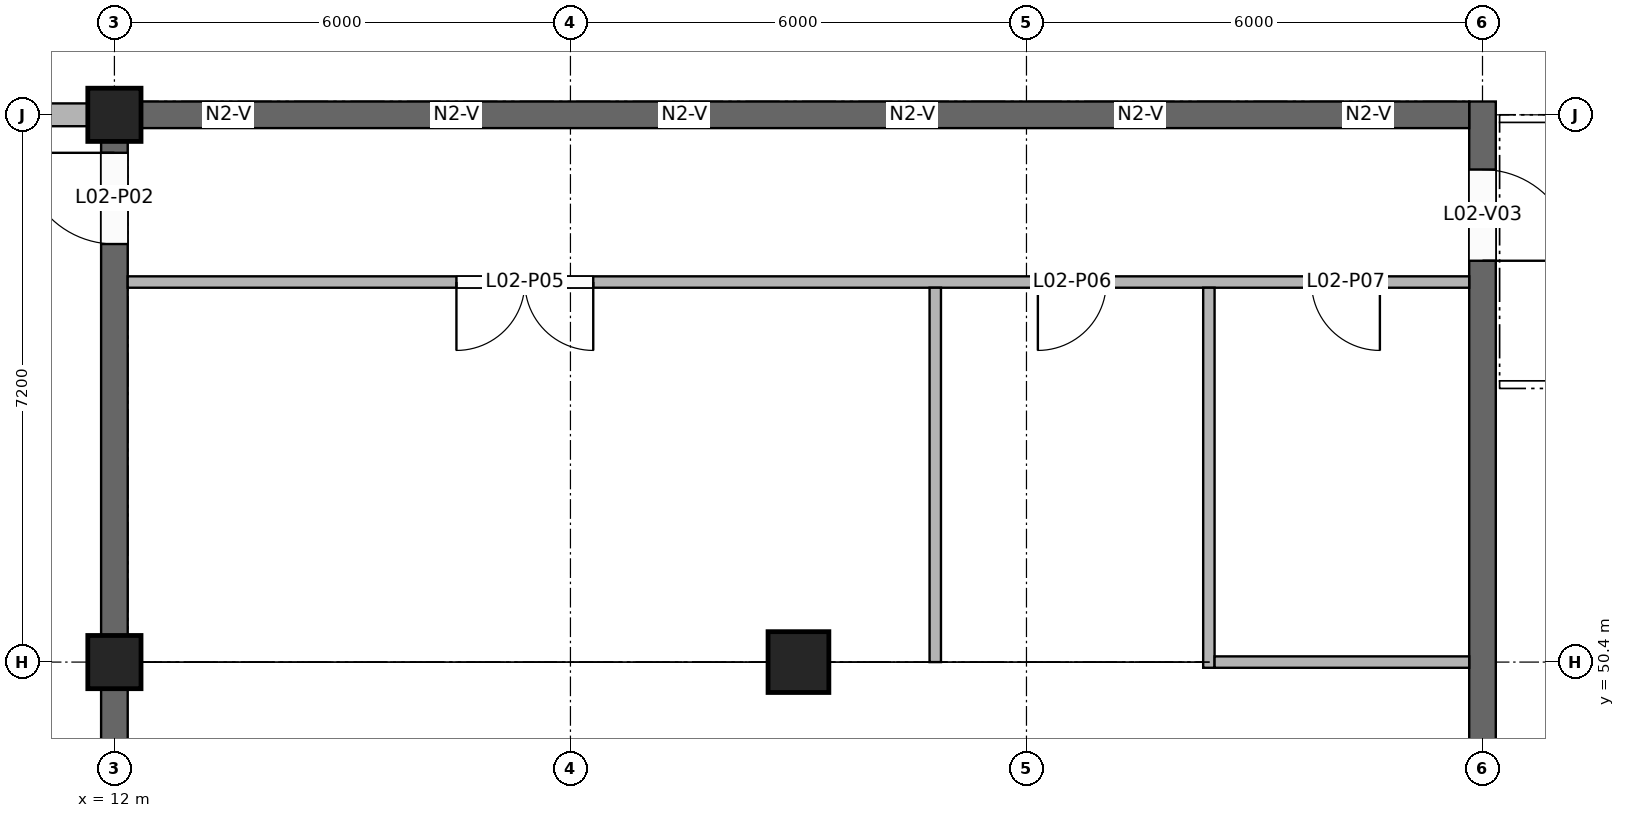
"""IFC4 building model, lengths in metres.
Left out: names, types, materials, properties, quantities, classifications, styles, units other than length and angle.
Written with IfcOpenShell. Run it as: python <this file> out.ifc"""

import sys

from ifc_helpers import new_model, si_unit, direction, frame, frame_2d, origin, origin_2d, place, context, subcontext, project, spatial, rectangle, extrude, element, fill, save


model = new_model("IFC4")
c1 = context("Model", 3, precision=1e-05, world=origin(), true_north=direction((0.0, 1.0)))
c2 = subcontext(c1, "Body", "Model", "MODEL_VIEW")
j1 = project(units=[si_unit("LENGTHUNIT", "METRE"), si_unit("PLANEANGLEUNIT", "RADIAN")], contexts=[c1])
p1 = place(None, origin())
s1 = spatial("IfcSite", under=j1, at=p1, CompositionType="ELEMENT")
p2 = place(p1, origin())
s2 = spatial("IfcBuilding", under=s1, at=p2, CompositionType="ELEMENT")
p3 = place(p2, frame((0.0, 0.0, 8.4)))
s3 = spatial("IfcBuildingStorey", under=s2, at=p3, CompositionType="ELEMENT", Elevation=8.4)
for number, where, z_axis, x_axis in (
    (1, (12.0, 50.4, 0.0), (0.0, 0.0, 1.0), (1.0, 0.0, 0.0)),
    (2, (12.0, 57.6, 0.0), (0.0, 0.0, 1.0), (1.0, 0.0, 0.0)),
):
    element("IfcColumn", number, at=place(p3, frame(where, z_axis=z_axis, x_axis=x_axis)), inside=s3, PredefinedType="COLUMN", context=c2, shape_type="SweptSolid", body=[
        extrude(rectangle(XDim=0.7, YDim=0.7, at=origin_2d()), origin(), (0.0, 0.0, 1.0), 4.0),
    ])
p4 = place(p3, frame((30.0, 35.825, 0.0), z_axis=(0.0, 0.0, 1.0), x_axis=(0.0, 1.0, 0.0)))
e3 = element("IfcWall", 3, at=p4, inside=s3, PredefinedType="SHEAR", context=c2, shape_type="SweptSolid", body=[
    extrude(rectangle(XDim=21.95, YDim=0.35, at=frame_2d((10.975, 0.0))), origin(), (0.0, 0.0, 1.0), 4.2),
])
p5 = place(p4, frame((19.855, 0.0, 0.0)))
e4 = element("IfcOpeningElement", 4, at=p5, cuts=e3, PredefinedType="OPENING", context=c2, shape_type="SweptSolid", body=[
    extrude(rectangle(XDim=1.2, YDim=2.4, at=frame_2d((0.6, 1.2))), frame((0.0, 0.185, 0.0), z_axis=(0.0, -1.0, 0.0), x_axis=(1.0, 0.0, 0.0)), (0.0, 0.0, 1.0), 0.37),
])
p6 = place(p3, frame((12.0, 43.55, 0.0), z_axis=(0.0, 0.0, 1.0), x_axis=(0.0, 1.0, 0.0)))
e5 = element("IfcWall", 5, at=p6, inside=s3, PredefinedType="SHEAR", context=c2, shape_type="SweptSolid", body=[
    extrude(rectangle(XDim=6.5, YDim=0.35, at=frame_2d((3.25, 0.0))), origin(), (0.0, 0.0, 1.0), 3.1),
])
p7 = place(p3, frame((12.0, 50.75, 0.0), z_axis=(0.0, 0.0, 1.0), x_axis=(0.0, 1.0, 0.0)))
e6 = element("IfcWall", 6, at=p7, inside=s3, PredefinedType="SHEAR", context=c2, shape_type="SweptSolid", body=[
    extrude(rectangle(XDim=6.5, YDim=0.35, at=frame_2d((3.25, 0.0))), origin(), (0.0, 0.0, 1.0), 3.1),
])
p8 = place(p7, frame((5.15, 0.0, 0.0)))
e7 = element("IfcOpeningElement", 7, at=p8, cuts=e6, PredefinedType="OPENING", context=c2, shape_type="SweptSolid", body=[
    extrude(rectangle(XDim=1.2, YDim=2.1, at=frame_2d((0.6, 1.05))), frame((0.0, 0.185, 0.0), z_axis=(0.0, -1.0, 0.0), x_axis=(1.0, 0.0, 0.0)), (0.0, 0.0, 1.0), 0.37),
])
p9 = place(p3, frame((12.35, 57.6, 0.0), z_axis=(0.0, 0.0, 1.0), x_axis=(1.0, 0.0, 0.0)))
e8 = element("IfcWall", 8, at=p9, inside=s3, PredefinedType="SHEAR", context=c2, shape_type="SweptSolid", body=[
    extrude(rectangle(XDim=17.475, YDim=0.35, at=frame_2d((8.737, 0.0))), origin(), (0.0, 0.0, 1.0), 4.2),
])
p10 = place(p9, frame((0.85, 0.0, 1.2)))
e9 = element("IfcOpeningElement", 9, at=p10, cuts=e8, PredefinedType="OPENING", context=c2, shape_type="SweptSolid", body=[
    extrude(rectangle(XDim=0.6, YDim=2.4, at=frame_2d((0.3, 1.2))), frame((0.0, 0.185, 0.0), z_axis=(0.0, -1.0, 0.0), x_axis=(1.0, 0.0, 0.0)), (0.0, 0.0, 1.0), 0.37),
])
p11 = place(p9, frame((3.85, 0.0, 1.2)))
e10 = element("IfcOpeningElement", 10, at=p11, cuts=e8, PredefinedType="OPENING", context=c2, shape_type="SweptSolid", body=[
    extrude(rectangle(XDim=0.6, YDim=2.4, at=frame_2d((0.3, 1.2))), frame((0.0, 0.185, 0.0), z_axis=(0.0, -1.0, 0.0), x_axis=(1.0, 0.0, 0.0)), (0.0, 0.0, 1.0), 0.37),
])
p12 = place(p9, frame((6.85, 0.0, 1.2)))
e11 = element("IfcOpeningElement", 11, at=p12, cuts=e8, PredefinedType="OPENING", context=c2, shape_type="SweptSolid", body=[
    extrude(rectangle(XDim=0.6, YDim=2.4, at=frame_2d((0.3, 1.2))), frame((0.0, 0.185, 0.0), z_axis=(0.0, -1.0, 0.0), x_axis=(1.0, 0.0, 0.0)), (0.0, 0.0, 1.0), 0.37),
])
p13 = place(p9, frame((9.85, 0.0, 1.2)))
e12 = element("IfcOpeningElement", 12, at=p13, cuts=e8, PredefinedType="OPENING", context=c2, shape_type="SweptSolid", body=[
    extrude(rectangle(XDim=0.6, YDim=2.4, at=frame_2d((0.3, 1.2))), frame((0.0, 0.185, 0.0), z_axis=(0.0, -1.0, 0.0), x_axis=(1.0, 0.0, 0.0)), (0.0, 0.0, 1.0), 0.37),
])
p14 = place(p9, frame((12.85, 0.0, 1.2)))
e13 = element("IfcOpeningElement", 13, at=p14, cuts=e8, PredefinedType="OPENING", context=c2, shape_type="SweptSolid", body=[
    extrude(rectangle(XDim=0.6, YDim=2.4, at=frame_2d((0.3, 1.2))), frame((0.0, 0.185, 0.0), z_axis=(0.0, -1.0, 0.0), x_axis=(1.0, 0.0, 0.0)), (0.0, 0.0, 1.0), 0.37),
])
p15 = place(p9, frame((15.85, 0.0, 1.2)))
e14 = element("IfcOpeningElement", 14, at=p15, cuts=e8, PredefinedType="OPENING", context=c2, shape_type="SweptSolid", body=[
    extrude(rectangle(XDim=0.6, YDim=2.4, at=frame_2d((0.3, 1.2))), frame((0.0, 0.185, 0.0), z_axis=(0.0, -1.0, 0.0), x_axis=(1.0, 0.0, 0.0)), (0.0, 0.0, 1.0), 0.37),
])
p16 = place(p3, frame((21.0, 50.4, 0.0), z_axis=(0.0, 0.0, 1.0), x_axis=(1.0, 0.0, 0.0)))
e15 = element("IfcColumn", 15, at=p16, inside=s3, PredefinedType="COLUMN", context=c2, shape_type="SweptSolid", body=[
    extrude(rectangle(XDim=0.8, YDim=0.8, at=origin_2d()), origin(), (0.0, 0.0, 1.0), 4.0),
])
p17 = place(p3, frame((6.0, 57.6, 0.0), z_axis=(0.0, 0.0, 1.0), x_axis=(1.0, 0.0, 0.0)))
e16 = element("IfcWall", 16, at=p17, inside=s3, PredefinedType="SOLIDWALL", context=c2, shape_type="SweptSolid", body=[
    extrude(rectangle(XDim=5.65, YDim=0.3, at=frame_2d((2.825, 0.0))), origin(), (0.0, 0.0, 1.0), 3.2),
])
p18 = place(p17, frame((2.13, 0.0, 0.0)))
e17 = element("IfcOpeningElement", 17, at=p18, cuts=e16, PredefinedType="OPENING", context=c2, shape_type="SweptSolid", body=[
    extrude(rectangle(XDim=1.2, YDim=2.4, at=frame_2d((0.6, 1.2))), frame((0.0, 0.16, 0.0), z_axis=(0.0, -1.0, 0.0), x_axis=(1.0, 0.0, 0.0)), (0.0, 0.0, 1.0), 0.32),
])
p19 = place(p17, frame((0.465, 0.0, 0.9)))
e18 = element("IfcOpeningElement", 18, at=p19, cuts=e16, PredefinedType="OPENING", context=c2, shape_type="SweptSolid", body=[
    extrude(rectangle(XDim=1.2, YDim=1.5, at=frame_2d((0.6, 0.75))), frame((0.0, 0.16, 0.0), z_axis=(0.0, -1.0, 0.0), x_axis=(1.0, 0.0, 0.0)), (0.0, 0.0, 1.0), 0.32),
])
p20 = place(p3, frame((22.8, 50.4, 0.0), z_axis=(0.0, 0.0, 1.0), x_axis=(0.0, 1.0, 0.0)))
e19 = element("IfcWall", 19, at=p20, inside=s3, PredefinedType="PARTITIONING", context=c2, shape_type="SweptSolid", body=[
    extrude(rectangle(XDim=4.925, YDim=0.15, at=frame_2d((2.462, 0.0))), origin(), (0.0, 0.0, 1.0), 3.2),
])
p21 = place(p3, frame((26.4, 50.325, 0.0), z_axis=(0.0, 0.0, 1.0), x_axis=(0.0, 1.0, 0.0)))
e20 = element("IfcWall", 20, at=p21, inside=s3, PredefinedType="PARTITIONING", context=c2, shape_type="SweptSolid", body=[
    extrude(rectangle(XDim=5.0, YDim=0.15, at=frame_2d((2.5, 0.0))), origin(), (0.0, 0.0, 1.0), 3.2),
])
p22 = place(p3, frame((26.475, 50.4, 0.0), z_axis=(0.0, 0.0, 1.0), x_axis=(1.0, 0.0, 0.0)))
e21 = element("IfcWall", 21, at=p22, inside=s3, PredefinedType="PARTITIONING", context=c2, shape_type="SweptSolid", body=[
    extrude(rectangle(XDim=3.35, YDim=0.15, at=frame_2d((1.675, 0.0))), origin(), (0.0, 0.0, 1.0), 3.2),
])
p23 = place(p3, frame((12.175, 55.4, 0.0), z_axis=(0.0, 0.0, 1.0), x_axis=(1.0, 0.0, 0.0)))
e22 = element("IfcWall", 22, at=p23, inside=s3, PredefinedType="PARTITIONING", context=c2, shape_type="SweptSolid", body=[
    extrude(rectangle(XDim=17.65, YDim=0.15, at=frame_2d((8.825, 0.0))), origin(), (0.0, 0.0, 1.0), 3.1),
])
p24 = place(p23, frame((4.325, 0.0, 0.0)))
e23 = element("IfcOpeningElement", 23, at=p24, cuts=e22, PredefinedType="OPENING", context=c2, shape_type="SweptSolid", body=[
    extrude(rectangle(XDim=1.8, YDim=2.1, at=frame_2d((0.9, 1.05))), frame((0.0, 0.085, 0.0), z_axis=(0.0, -1.0, 0.0), x_axis=(1.0, 0.0, 0.0)), (0.0, 0.0, 1.0), 0.17),
])
p25 = place(p23, frame((11.975, 0.0, 0.0)))
e24 = element("IfcOpeningElement", 24, at=p25, cuts=e22, PredefinedType="OPENING", context=c2, shape_type="SweptSolid", body=[
    extrude(rectangle(XDim=0.9, YDim=2.1, at=frame_2d((0.45, 1.05))), frame((0.0, 0.085, 0.0), z_axis=(0.0, -1.0, 0.0), x_axis=(1.0, 0.0, 0.0)), (0.0, 0.0, 1.0), 0.17),
])
p26 = place(p23, frame((15.575, 0.0, 0.0)))
e25 = element("IfcOpeningElement", 25, at=p26, cuts=e22, PredefinedType="OPENING", context=c2, shape_type="SweptSolid", body=[
    extrude(rectangle(XDim=0.9, YDim=2.1, at=frame_2d((0.45, 1.05))), frame((0.0, 0.085, 0.0), z_axis=(0.0, -1.0, 0.0), x_axis=(1.0, 0.0, 0.0)), (0.0, 0.0, 1.0), 0.17),
])
p27 = place(p5, frame((1.2, 0.0, 0.0), z_axis=(0.0, 0.0, 1.0), x_axis=(-1.0, 0.0, 0.0)))
e26 = element("IfcDoor", 26, at=p27, inside=s3, OperationType="SINGLE_SWING_RIGHT", PredefinedType="DOOR", context=c2, shape_type="SweptSolid", body=[
    extrude(rectangle(XDim=1.2, YDim=2.4, at=frame_2d((0.6, 1.2))), frame((0.0, 0.025, 0.0), z_axis=(0.0, -1.0, 0.0), x_axis=(1.0, 0.0, 0.0)), (0.0, 0.0, 1.0), 0.05),
])
fill(e4, e26)
p28 = place(p10, origin())
e27 = element("IfcWindow", 27, at=p28, inside=s3, PartitioningType="SINGLE_PANEL", PredefinedType="WINDOW", context=c2, shape_type="SweptSolid", body=[
    extrude(rectangle(XDim=0.6, YDim=2.4, at=frame_2d((0.3, 1.2))), frame((0.0, 0.03, 0.0), z_axis=(0.0, -1.0, 0.0), x_axis=(1.0, 0.0, 0.0)), (0.0, 0.0, 1.0), 0.06),
])
fill(e9, e27)
p29 = place(p11, origin())
e28 = element("IfcWindow", 28, at=p29, inside=s3, PartitioningType="SINGLE_PANEL", PredefinedType="WINDOW", context=c2, shape_type="SweptSolid", body=[
    extrude(rectangle(XDim=0.6, YDim=2.4, at=frame_2d((0.3, 1.2))), frame((0.0, 0.03, 0.0), z_axis=(0.0, -1.0, 0.0), x_axis=(1.0, 0.0, 0.0)), (0.0, 0.0, 1.0), 0.06),
])
fill(e10, e28)
p30 = place(p12, origin())
e29 = element("IfcWindow", 29, at=p30, inside=s3, PartitioningType="SINGLE_PANEL", PredefinedType="WINDOW", context=c2, shape_type="SweptSolid", body=[
    extrude(rectangle(XDim=0.6, YDim=2.4, at=frame_2d((0.3, 1.2))), frame((0.0, 0.03, 0.0), z_axis=(0.0, -1.0, 0.0), x_axis=(1.0, 0.0, 0.0)), (0.0, 0.0, 1.0), 0.06),
])
fill(e11, e29)
p31 = place(p13, origin())
e30 = element("IfcWindow", 30, at=p31, inside=s3, PartitioningType="SINGLE_PANEL", PredefinedType="WINDOW", context=c2, shape_type="SweptSolid", body=[
    extrude(rectangle(XDim=0.6, YDim=2.4, at=frame_2d((0.3, 1.2))), frame((0.0, 0.03, 0.0), z_axis=(0.0, -1.0, 0.0), x_axis=(1.0, 0.0, 0.0)), (0.0, 0.0, 1.0), 0.06),
])
fill(e12, e30)
p32 = place(p14, origin())
e31 = element("IfcWindow", 31, at=p32, inside=s3, PartitioningType="SINGLE_PANEL", PredefinedType="WINDOW", context=c2, shape_type="SweptSolid", body=[
    extrude(rectangle(XDim=0.6, YDim=2.4, at=frame_2d((0.3, 1.2))), frame((0.0, 0.03, 0.0), z_axis=(0.0, -1.0, 0.0), x_axis=(1.0, 0.0, 0.0)), (0.0, 0.0, 1.0), 0.06),
])
fill(e13, e31)
p33 = place(p15, origin())
e32 = element("IfcWindow", 32, at=p33, inside=s3, PartitioningType="SINGLE_PANEL", PredefinedType="WINDOW", context=c2, shape_type="SweptSolid", body=[
    extrude(rectangle(XDim=0.6, YDim=2.4, at=frame_2d((0.3, 1.2))), frame((0.0, 0.03, 0.0), z_axis=(0.0, -1.0, 0.0), x_axis=(1.0, 0.0, 0.0)), (0.0, 0.0, 1.0), 0.06),
])
fill(e14, e32)
p34 = place(p8, origin())
e33 = element("IfcDoor", 33, at=p34, inside=s3, OperationType="SINGLE_SWING_RIGHT", PredefinedType="DOOR", context=c2, shape_type="SweptSolid", body=[
    extrude(rectangle(XDim=1.2, YDim=2.1, at=frame_2d((0.6, 1.05))), frame((0.0, 0.025, 0.0), z_axis=(0.0, -1.0, 0.0), x_axis=(1.0, 0.0, 0.0)), (0.0, 0.0, 1.0), 0.05),
])
fill(e7, e33)
p35 = place(p24, frame((1.8, 0.0, 0.0), z_axis=(0.0, 0.0, 1.0), x_axis=(-1.0, 0.0, 0.0)))
e34 = element("IfcDoor", 34, at=p35, inside=s3, OperationType="DOUBLE_DOOR_SINGLE_SWING", PredefinedType="DOOR", context=c2, shape_type="SweptSolid", body=[
    extrude(rectangle(XDim=1.8, YDim=2.1, at=frame_2d((0.9, 1.05))), frame((0.0, 0.025, 0.0), z_axis=(0.0, -1.0, 0.0), x_axis=(1.0, 0.0, 0.0)), (0.0, 0.0, 1.0), 0.05),
])
fill(e23, e34)
p36 = place(p25, frame((0.9, 0.0, 0.0), z_axis=(0.0, 0.0, 1.0), x_axis=(-1.0, 0.0, 0.0)))
e35 = element("IfcDoor", 35, at=p36, inside=s3, OperationType="SINGLE_SWING_RIGHT", PredefinedType="DOOR", context=c2, shape_type="SweptSolid", body=[
    extrude(rectangle(XDim=0.9, YDim=2.1, at=frame_2d((0.45, 1.05))), frame((0.0, 0.025, 0.0), z_axis=(0.0, -1.0, 0.0), x_axis=(1.0, 0.0, 0.0)), (0.0, 0.0, 1.0), 0.05),
])
fill(e24, e35)
p37 = place(p26, frame((0.9, 0.0, 0.0), z_axis=(0.0, 0.0, 1.0), x_axis=(-1.0, 0.0, 0.0)))
e36 = element("IfcDoor", 36, at=p37, inside=s3, OperationType="SINGLE_SWING_LEFT", PredefinedType="DOOR", context=c2, shape_type="SweptSolid", body=[
    extrude(rectangle(XDim=0.9, YDim=2.1, at=frame_2d((0.45, 1.05))), frame((0.0, 0.025, 0.0), z_axis=(0.0, -1.0, 0.0), x_axis=(1.0, 0.0, 0.0)), (0.0, 0.0, 1.0), 0.05),
])
fill(e25, e36)
save(model, sys.argv[1])
